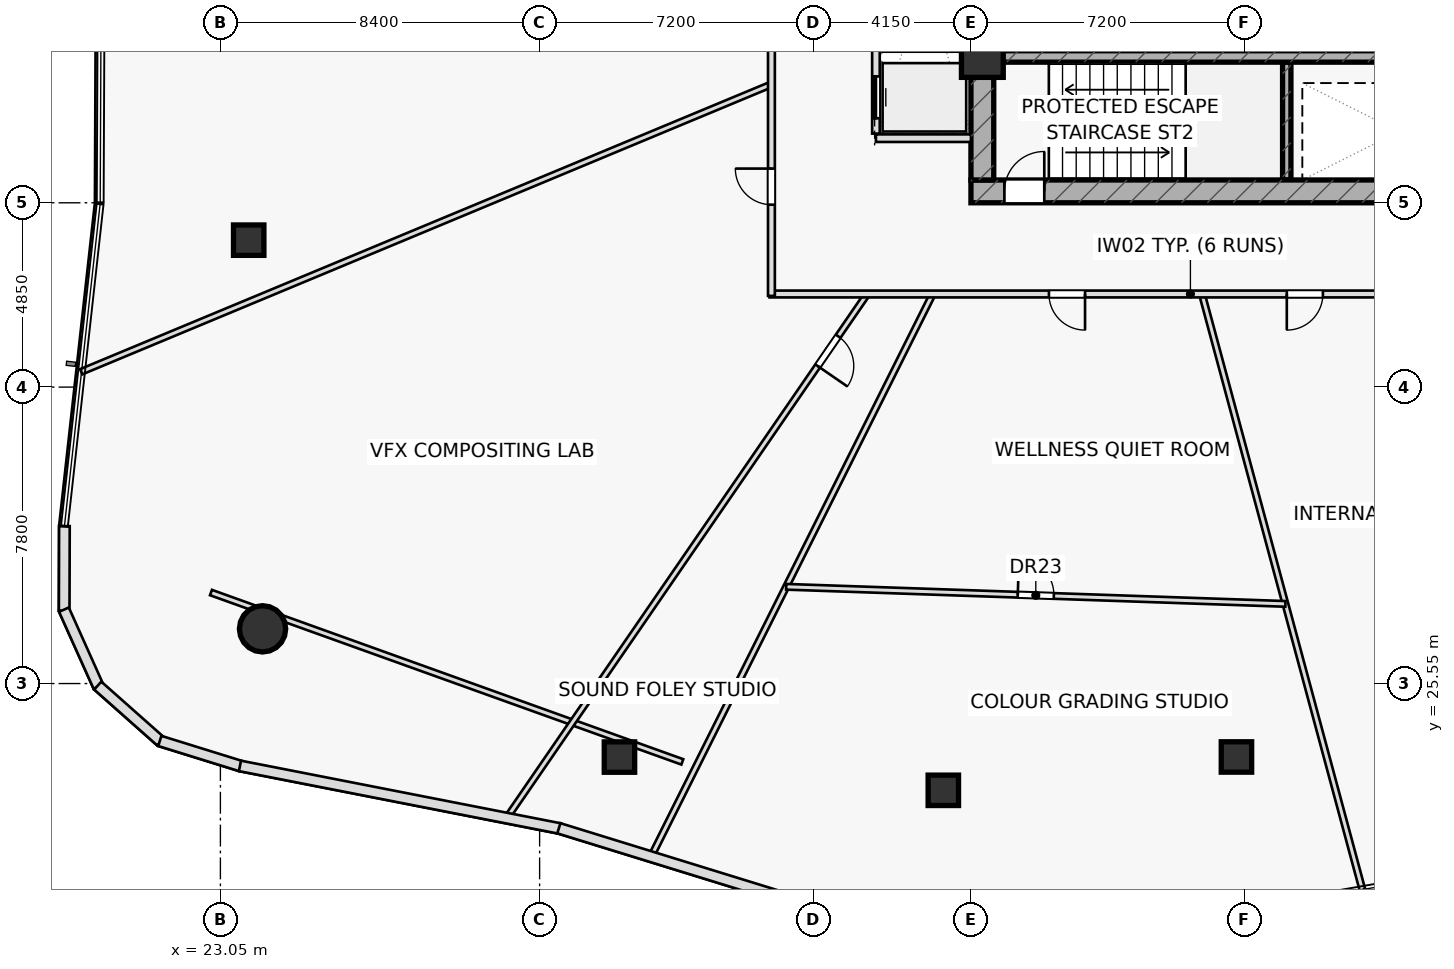
"""IFC4 building model, lengths in metres.
Left out: names, types, materials, properties, quantities, classifications, styles, units other than length and angle.
Written with IfcOpenShell. Run it as: python <this file> out.ifc"""

import sys

from ifc_helpers import new_model, si_unit, direction, frame, frame_2d, origin, origin_2d, place, context, subcontext, project, spatial, rectangle, hollow_rectangle, hollow_circle, extrude, element, fill, save


model = new_model("IFC4")
c1 = context("Model", 3, precision=1e-05, world=origin(), true_north=direction((0.0, 1.0)))
c2 = subcontext(c1, "Body", "Model", "MODEL_VIEW")
j1 = project(units=[si_unit("LENGTHUNIT", "METRE"), si_unit("PLANEANGLEUNIT", "RADIAN")], contexts=[c1])
p1 = place(None, origin())
s1 = spatial("IfcSite", under=j1, at=p1, CompositionType="ELEMENT")
p2 = place(p1, origin())
s2 = spatial("IfcBuilding", under=s1, at=p2, CompositionType="ELEMENT")
p3 = place(p2, frame((0.0, 0.0, 51.0)))
s3 = spatial("IfcBuildingStorey", under=s2, at=p3, CompositionType="ELEMENT", Elevation=51.0)
p4 = place(p3, frame((51.11, 38.8, 0.0), z_axis=(0.0, 0.0, 1.0), x_axis=(0.0, 1.0, 0.0)))
e1 = element("IfcWall", 1, at=p4, inside=s3, PredefinedType="SHEAR", context=c2, shape_type="SweptSolid", body=[
    extrude(rectangle(XDim=3.1, YDim=0.22, at=frame_2d((1.55, 0.0))), origin(), (0.0, 0.0, 1.0), 3.6),
])
p5 = place(p3, frame((42.8, 38.5, 0.0), z_axis=(0.0, 0.0, 1.0), x_axis=(1.0, 0.0, 0.0)))
e2 = element("IfcWall", 2, at=p5, inside=s3, PredefinedType="SHEAR", context=c2, shape_type="SweptSolid", body=[
    extrude(rectangle(XDim=14.4, YDim=0.6, at=frame_2d((7.2, 0.0))), origin(), (0.0, 0.0, 1.0), 3.6),
])
p6 = place(p5, frame((0.88, 0.0, 0.0)))
e3 = element("IfcOpeningElement", 3, at=p6, cuts=e2, PredefinedType="OPENING", context=c2, shape_type="SweptSolid", body=[
    extrude(rectangle(XDim=1.05, YDim=2.2, at=frame_2d((0.525, 1.1))), frame((0.0, 0.31, 0.0), z_axis=(0.0, -1.0, 0.0), x_axis=(1.0, 0.0, 0.0)), (0.0, 0.0, 1.0), 0.62),
])
p7 = place(p3, frame((43.1, 38.8, 0.0), z_axis=(0.0, 0.0, 1.0), x_axis=(0.0, 1.0, 0.0)))
e4 = element("IfcWall", 4, at=p7, inside=s3, PredefinedType="SHEAR", context=c2, shape_type="SweptSolid", body=[
    extrude(rectangle(XDim=12.4, YDim=0.6, at=frame_2d((6.2, 0.0))), origin(), (0.0, 0.0, 1.0), 3.6),
])
p8 = place(p3, frame((43.4, 42.05, 0.0), z_axis=(0.0, 0.0, 1.0), x_axis=(1.0, 0.0, 0.0)))
e5 = element("IfcWall", 5, at=p8, inside=s3, PredefinedType="SHEAR", context=c2, shape_type="SweptSolid", body=[
    extrude(rectangle(XDim=13.2, YDim=0.3, at=frame_2d((6.6, 0.0))), origin(), (0.0, 0.0, 1.0), 3.6),
])
p9 = place(p3, frame((43.1, 42.05, 0.0), z_axis=(0.0, 0.0, 1.0), x_axis=(1.0, 0.0, 0.0)))
e6 = element("IfcColumn", 6, at=p9, inside=s3, PredefinedType="COLUMN", context=c2, shape_type="SweptSolid", body=[
    extrude(rectangle(XDim=1.1, YDim=1.1, at=origin_2d()), origin(), (0.0, 0.0, 1.0), 3.6),
])
p10 = place(p3, frame((23.795, 37.216, 0.0), z_axis=(0.0, 0.0, 1.0), x_axis=(1.0, 0.0, 0.0)))
e7 = element("IfcColumn", 7, at=p10, inside=s3, PredefinedType="COLUMN", context=c2, shape_type="SweptSolid", body=[
    extrude(hollow_rectangle(XDim=0.8, YDim=0.8, WallThickness=0.045, at=origin_2d()), origin(), (0.0, 0.0, 1.0), 3.6),
])
p11 = place(p3, frame((24.159, 26.99, 0.0), z_axis=(0.0, 0.0, 1.0), x_axis=(1.0, 0.0, 0.0)))
e8 = element("IfcColumn", 8, at=p11, inside=s3, PredefinedType="COLUMN", context=c2, shape_type="SweptSolid", body=[
    extrude(hollow_circle(Radius=0.61, WallThickness=0.05, at=origin_2d()), origin(), (0.0, 0.0, 1.0), 3.6),
])
for number, where, z_axis, x_axis in (
    (9, (33.551, 23.615, 0.0), (0.0, 0.0, 1.0), (1.0, 0.0, 0.0)),
    (10, (42.073, 22.74, 0.0), (0.0, 0.0, 1.0), (1.0, 0.0, 0.0)),
    (11, (49.787, 23.618, 0.0), (0.0, 0.0, 1.0), (1.0, 0.0, 0.0)),
):
    element("IfcColumn", number, at=place(p3, frame(where, z_axis=z_axis, x_axis=x_axis)), inside=s3, PredefinedType="COLUMN", context=c2, shape_type="SweptSolid", body=[
        extrude(hollow_rectangle(XDim=0.8, YDim=0.8, WallThickness=0.045, at=origin_2d()), origin(), (0.0, 0.0, 1.0), 3.6),
    ])
p12 = place(p3, frame((40.3, 39.9, 0.0), z_axis=(0.0, 0.0, 1.0), x_axis=(1.0, 0.0, 0.0)))
e12 = element("IfcWall", 12, at=p12, inside=s3, PredefinedType="PARTITIONING", context=c2, shape_type="SweptSolid", body=[
    extrude(rectangle(XDim=2.5, YDim=0.2, at=frame_2d((1.25, 0.0))), origin(), (0.0, 0.0, 1.0), 3.6),
])
p13 = place(p3, frame((22.802, 27.945, 0.0), z_axis=(0.0, 0.0, 1.0), x_axis=(0.941102349209, -0.338121824662, 0.0)))
e13 = element("IfcWall", 13, at=p13, inside=s3, PredefinedType="PARTITIONING", context=c2, shape_type="SweptSolid", body=[
    extrude(rectangle(XDim=13.18, YDim=0.15, at=frame_2d((6.59, 0.0))), origin(), (0.0, 0.0, 1.0), 2.925),
])
p14 = place(p3, frame((37.55, 41.316, 0.0), z_axis=(0.0, 0.0, 1.0), x_axis=(-0.923195824761, -0.384329896241, 0.0)))
e14 = element("IfcWall", 14, at=p14, inside=s3, PredefinedType="PARTITIONING", context=c2, shape_type="SweptSolid", body=[
    extrude(rectangle(XDim=19.675, YDim=0.15, at=frame_2d((9.838, 0.0))), origin(), (0.0, 0.0, 1.0), 2.925),
])
p15 = place(p3, frame((40.07, 35.8, 0.0), z_axis=(0.0, 0.0, 1.0), x_axis=(-0.566800354016, -0.823855180652, 0.0)))
e15 = element("IfcWall", 15, at=p15, inside=s3, PredefinedType="PARTITIONING", context=c2, shape_type="SweptSolid", body=[
    extrude(rectangle(XDim=16.75, YDim=0.15, at=frame_2d((8.375, 0.0))), origin(), (0.0, 0.0, 1.0), 2.975),
])
p16 = place(p15, frame((1.35, 0.0, 0.0)))
e16 = element("IfcOpeningElement", 16, at=p16, cuts=e15, PredefinedType="OPENING", context=c2, shape_type="SweptSolid", body=[
    extrude(rectangle(XDim=0.95, YDim=2.05, at=frame_2d((0.475, 1.025))), frame((0.0, 0.085, 0.0), z_axis=(0.0, -1.0, 0.0), x_axis=(1.0, 0.0, 0.0)), (0.0, 0.0, 1.0), 0.17),
])
p17 = place(p3, frame((41.795, 35.8, 0.0), z_axis=(0.0, 0.0, 1.0), x_axis=(-0.44763793032, -0.894214897739, 0.0)))
e17 = element("IfcWall", 17, at=p17, inside=s3, PredefinedType="PARTITIONING", context=c2, shape_type="SweptSolid", body=[
    extrude(rectangle(XDim=16.568, YDim=0.15, at=frame_2d((8.284, 0.0))), origin(), (0.0, 0.0, 1.0), 2.975),
])
p18 = place(p3, frame((48.878, 35.8, 0.0), z_axis=(0.0, 0.0, 1.0), x_axis=(0.260103938271, -0.965580623923, 0.0)))
e18 = element("IfcWall", 18, at=p18, inside=s3, PredefinedType="PARTITIONING", context=c2, shape_type="SweptSolid", body=[
    extrude(rectangle(XDim=16.24, YDim=0.15, at=frame_2d((8.12, 0.0))), origin(), (0.0, 0.0, 1.0), 2.975),
])
p19 = place(p3, frame((37.938, 28.096, 0.0), z_axis=(0.0, 0.0, 1.0), x_axis=(0.999413957747, -0.034230703491, 0.0)))
e19 = element("IfcWall", 19, at=p19, inside=s3, PredefinedType="PARTITIONING", context=c2, shape_type="SweptSolid", body=[
    extrude(rectangle(XDim=13.145, YDim=0.15, at=frame_2d((6.572, 0.0))), origin(), (0.0, 0.0, 1.0), 2.925),
])
p20 = place(p19, frame((6.097, 0.0, 0.0)))
e20 = element("IfcOpeningElement", 20, at=p20, cuts=e19, PredefinedType="OPENING", context=c2, shape_type="SweptSolid", body=[
    extrude(rectangle(XDim=0.95, YDim=2.05, at=frame_2d((0.475, 1.025))), frame((0.0, 0.085, 0.0), z_axis=(0.0, -1.0, 0.0), x_axis=(1.0, 0.0, 0.0)), (0.0, 0.0, 1.0), 0.17),
])
p21 = place(p3, frame((59.65, 35.8, 0.0), z_axis=(0.0, 0.0, 1.0), x_axis=(-1.0, 0.0, 0.0)))
e21 = element("IfcWall", 21, at=p21, inside=s3, PredefinedType="PARTITIONING", context=c2, shape_type="SweptSolid", body=[
    extrude(rectangle(XDim=22.15, YDim=0.18, at=frame_2d((11.075, 0.0))), origin(), (0.0, 0.0, 1.0), 2.925),
])
p22 = place(p21, frame((2.493, 0.0, 0.0)))
e22 = element("IfcOpeningElement", 22, at=p22, cuts=e21, PredefinedType="OPENING", context=c2, shape_type="SweptSolid", body=[
    extrude(rectangle(XDim=0.95, YDim=2.05, at=frame_2d((0.475, 1.025))), frame((0.0, 0.1, 0.0), z_axis=(0.0, -1.0, 0.0), x_axis=(1.0, 0.0, 0.0)), (0.0, 0.0, 1.0), 0.2),
])
p23 = place(p21, frame((7.588, 0.0, 0.0)))
e23 = element("IfcOpeningElement", 23, at=p23, cuts=e21, PredefinedType="OPENING", context=c2, shape_type="SweptSolid", body=[
    extrude(rectangle(XDim=0.95, YDim=2.05, at=frame_2d((0.475, 1.025))), frame((0.0, 0.1, 0.0), z_axis=(0.0, -1.0, 0.0), x_axis=(1.0, 0.0, 0.0)), (0.0, 0.0, 1.0), 0.2),
])
p24 = place(p21, frame((13.848, 0.0, 0.0)))
e24 = element("IfcOpeningElement", 24, at=p24, cuts=e21, PredefinedType="OPENING", context=c2, shape_type="SweptSolid", body=[
    extrude(rectangle(XDim=0.95, YDim=2.05, at=frame_2d((0.475, 1.025))), frame((0.0, 0.1, 0.0), z_axis=(0.0, -1.0, 0.0), x_axis=(1.0, 0.0, 0.0)), (0.0, 0.0, 1.0), 0.2),
])
p25 = place(p3, frame((37.55, 35.75, 0.0), z_axis=(0.0, 0.0, 1.0), x_axis=(0.0, 1.0, 0.0)))
e25 = element("IfcWall", 25, at=p25, inside=s3, PredefinedType="PARTITIONING", context=c2, shape_type="SweptSolid", body=[
    extrude(rectangle(XDim=12.75, YDim=0.18, at=frame_2d((6.375, 0.0))), origin(), (0.0, 0.0, 1.0), 2.925),
])
p26 = place(p25, frame((2.4, 0.0, 0.0)))
e26 = element("IfcOpeningElement", 26, at=p26, cuts=e25, PredefinedType="OPENING", context=c2, shape_type="SweptSolid", body=[
    extrude(rectangle(XDim=0.95, YDim=2.05, at=frame_2d((0.475, 1.025))), frame((0.0, 0.1, 0.0), z_axis=(0.0, -1.0, 0.0), x_axis=(1.0, 0.0, 0.0)), (0.0, 0.0, 1.0), 0.2),
])
p27 = place(p25, frame((8.547, 0.0, 0.0)))
e27 = element("IfcOpeningElement", 27, at=p27, cuts=e25, PredefinedType="OPENING", context=c2, shape_type="SweptSolid", body=[
    extrude(rectangle(XDim=0.95, YDim=2.05, at=frame_2d((0.475, 1.025))), frame((0.0, 0.1, 0.0), z_axis=(0.0, -1.0, 0.0), x_axis=(1.0, 0.0, 0.0)), (0.0, 0.0, 1.0), 0.2),
])
p28 = place(p3, frame((18.946, 29.693, 0.0), z_axis=(0.0, 0.0, 1.0), x_axis=(-0.002630127889, -0.999996541208, 0.0)))
e28 = element("IfcWall", 28, at=p28, inside=s3, PredefinedType="STANDARD", context=c2, shape_type="SweptSolid", body=[
    extrude(rectangle(XDim=2.228, YDim=0.28, at=frame_2d((1.114, 0.0))), origin(), (0.0, 0.0, 1.0), 3.6),
])
p29 = place(p3, frame((18.934, 27.494, 0.0), z_axis=(0.0, 0.0, 1.0), x_axis=(0.409141305043, -0.912471036531, 0.0)))
e29 = element("IfcWall", 29, at=p29, inside=s3, PredefinedType="STANDARD", context=c2, shape_type="SweptSolid", body=[
    extrude(rectangle(XDim=2.216, YDim=0.28, at=frame_2d((1.108, 0.0))), origin(), (0.0, 0.0, 1.0), 3.6),
])
p30 = place(p3, frame((19.823, 25.495, 0.0), z_axis=(0.0, 0.0, 1.0), x_axis=(0.748302192262, -0.663357994642, 0.0)))
e30 = element("IfcWall", 30, at=p30, inside=s3, PredefinedType="STANDARD", context=c2, shape_type="SweptSolid", body=[
    extrude(rectangle(XDim=2.216, YDim=0.28, at=frame_2d((1.108, 0.0))), origin(), (0.0, 0.0, 1.0), 3.6),
])
p31 = place(p3, frame((21.456, 24.04, 0.0), z_axis=(0.0, 0.0, 1.0), x_axis=(0.955023674614, -0.296529561639, 0.0)))
e31 = element("IfcWall", 31, at=p31, inside=s3, PredefinedType="STANDARD", context=c2, shape_type="SweptSolid", body=[
    extrude(rectangle(XDim=2.239, YDim=0.28, at=frame_2d((1.119, 0.0))), origin(), (0.0, 0.0, 1.0), 3.6),
])
p32 = place(p3, frame((23.565, 23.383, 0.0), z_axis=(0.0, 0.0, 1.0), x_axis=(0.981376799154, -0.19209262891, 0.0)))
e32 = element("IfcWall", 32, at=p32, inside=s3, PredefinedType="STANDARD", context=c2, shape_type="SweptSolid", body=[
    extrude(rectangle(XDim=8.58, YDim=0.28, at=frame_2d((4.29, 0.0))), origin(), (0.0, 0.0, 1.0), 3.6),
])
p33 = place(p3, frame((31.956, 21.742, 0.0), z_axis=(0.0, 0.0, 1.0), x_axis=(0.955553599727, -0.294817431725, 0.0)))
e33 = element("IfcWall", 33, at=p33, inside=s3, PredefinedType="STANDARD", context=c2, shape_type="SweptSolid", body=[
    extrude(rectangle(XDim=9.168, YDim=0.28, at=frame_2d((4.584, 0.0))), origin(), (0.0, 0.0, 1.0), 3.6),
])
p34 = place(p3, frame((40.3, 40.02, 0.0), z_axis=(0.0, 0.0, 1.0), x_axis=(0.0, 1.0, 0.0)))
e34 = element("IfcWall", 34, at=p34, inside=s3, PredefinedType="PARTITIONING", context=c2, shape_type="SweptSolid", body=[
    extrude(rectangle(XDim=8.21, YDim=0.2, at=frame_2d((4.105, 0.0))), origin(), (0.0, 0.0, 1.0), 3.6),
])
p35 = place(p34, frame((0.405, 0.0, 0.0)))
e35 = element("IfcOpeningElement", 35, at=p35, cuts=e34, PredefinedType="OPENING", context=c2, shape_type="SweptSolid", body=[
    extrude(rectangle(XDim=1.1, YDim=2.15, at=frame_2d((0.55, 1.075))), frame((0.0, 0.11, 0.0), z_axis=(0.0, -1.0, 0.0), x_axis=(1.0, 0.0, 0.0)), (0.0, 0.0, 1.0), 0.22),
])
p36 = place(p34, frame((2.505, 0.0, 0.0)))
e36 = element("IfcOpeningElement", 36, at=p36, cuts=e34, PredefinedType="OPENING", context=c2, shape_type="SweptSolid", body=[
    extrude(rectangle(XDim=1.1, YDim=2.15, at=frame_2d((0.55, 1.075))), frame((0.0, 0.11, 0.0), z_axis=(0.0, -1.0, 0.0), x_axis=(1.0, 0.0, 0.0)), (0.0, 0.0, 1.0), 0.22),
])
p37 = place(p34, frame((4.605, 0.0, 0.0)))
e37 = element("IfcOpeningElement", 37, at=p37, cuts=e34, PredefinedType="OPENING", context=c2, shape_type="SweptSolid", body=[
    extrude(rectangle(XDim=1.1, YDim=2.15, at=frame_2d((0.55, 1.075))), frame((0.0, 0.11, 0.0), z_axis=(0.0, -1.0, 0.0), x_axis=(1.0, 0.0, 0.0)), (0.0, 0.0, 1.0), 0.22),
])
p38 = place(p34, frame((6.705, 0.0, 0.0)))
e38 = element("IfcOpeningElement", 38, at=p38, cuts=e34, PredefinedType="OPENING", context=c2, shape_type="SweptSolid", body=[
    extrude(rectangle(XDim=1.1, YDim=2.15, at=frame_2d((0.55, 1.075))), frame((0.0, 0.11, 0.0), z_axis=(0.0, -1.0, 0.0), x_axis=(1.0, 0.0, 0.0)), (0.0, 0.0, 1.0), 0.22),
])
p39 = place(p6, origin())
e39 = element("IfcDoor", 39, at=p39, inside=s3, OperationType="SINGLE_SWING_RIGHT", PredefinedType="DOOR", context=c2, shape_type="SweptSolid", body=[
    extrude(rectangle(XDim=1.05, YDim=2.2, at=frame_2d((0.525, 1.1))), frame((0.0, 0.025, 0.0), z_axis=(0.0, -1.0, 0.0), x_axis=(1.0, 0.0, 0.0)), (0.0, 0.0, 1.0), 0.05),
])
fill(e3, e39)
p40 = place(p16, origin())
e40 = element("IfcDoor", 40, at=p40, inside=s3, OperationType="SINGLE_SWING_RIGHT", PredefinedType="DOOR", context=c2, shape_type="SweptSolid", body=[
    extrude(rectangle(XDim=0.95, YDim=2.05, at=frame_2d((0.475, 1.025))), frame((0.0, 0.025, 0.0), z_axis=(0.0, -1.0, 0.0), x_axis=(1.0, 0.0, 0.0)), (0.0, 0.0, 1.0), 0.05),
])
fill(e16, e40)
p41 = place(p20, origin())
e41 = element("IfcDoor", 41, at=p41, inside=s3, OperationType="SINGLE_SWING_LEFT", PredefinedType="DOOR", context=c2, shape_type="SweptSolid", body=[
    extrude(rectangle(XDim=0.95, YDim=2.05, at=frame_2d((0.475, 1.025))), frame((0.0, 0.025, 0.0), z_axis=(0.0, -1.0, 0.0), x_axis=(1.0, 0.0, 0.0)), (0.0, 0.0, 1.0), 0.05),
])
fill(e20, e41)
p42 = place(p23, origin())
e42 = element("IfcDoor", 42, at=p42, inside=s3, OperationType="SINGLE_SWING_RIGHT", PredefinedType="DOOR", context=c2, shape_type="SweptSolid", body=[
    extrude(rectangle(XDim=0.95, YDim=2.05, at=frame_2d((0.475, 1.025))), frame((0.0, 0.025, 0.0), z_axis=(0.0, -1.0, 0.0), x_axis=(1.0, 0.0, 0.0)), (0.0, 0.0, 1.0), 0.05),
])
fill(e23, e42)
p43 = place(p24, origin())
e43 = element("IfcDoor", 43, at=p43, inside=s3, OperationType="SINGLE_SWING_LEFT", PredefinedType="DOOR", context=c2, shape_type="SweptSolid", body=[
    extrude(rectangle(XDim=0.95, YDim=2.05, at=frame_2d((0.475, 1.025))), frame((0.0, 0.025, 0.0), z_axis=(0.0, -1.0, 0.0), x_axis=(1.0, 0.0, 0.0)), (0.0, 0.0, 1.0), 0.05),
])
fill(e24, e43)
p44 = place(p26, origin())
e44 = element("IfcDoor", 44, at=p44, inside=s3, OperationType="SINGLE_SWING_RIGHT", PredefinedType="DOOR", context=c2, shape_type="SweptSolid", body=[
    extrude(rectangle(XDim=0.95, YDim=2.05, at=frame_2d((0.475, 1.025))), frame((0.0, 0.025, 0.0), z_axis=(0.0, -1.0, 0.0), x_axis=(1.0, 0.0, 0.0)), (0.0, 0.0, 1.0), 0.05),
])
fill(e26, e44)
p45 = place(p35, origin())
e45 = element("IfcDoor", 45, at=p45, inside=s3, OperationType="SLIDING_TO_LEFT", PredefinedType="DOOR", context=c2, shape_type="SweptSolid", body=[
    extrude(rectangle(XDim=1.1, YDim=2.15, at=frame_2d((0.55, 1.075))), frame((0.0, 0.025, 0.0), z_axis=(0.0, -1.0, 0.0), x_axis=(1.0, 0.0, 0.0)), (0.0, 0.0, 1.0), 0.05),
])
fill(e35, e45)
save(model, sys.argv[1])
